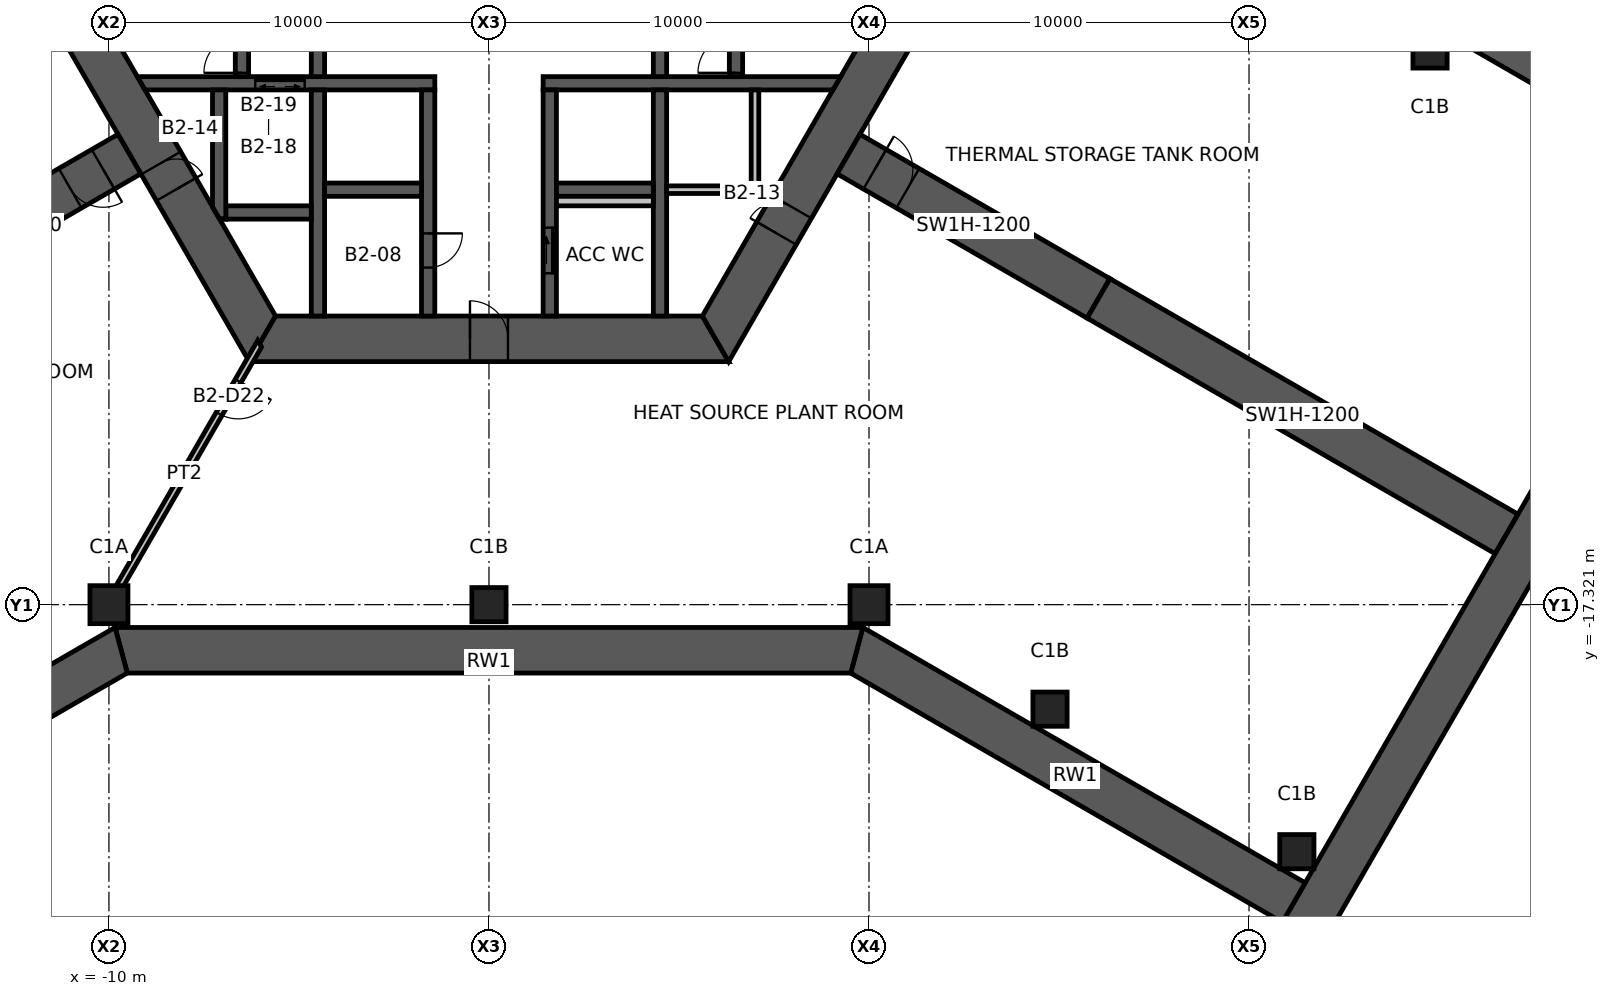
"""IFC4 building model, lengths in metres.
Left out: names, types, materials, properties, quantities, classifications, styles, units other than length and angle.
Written with IfcOpenShell. Run it as: python <this file> out.ifc"""

import sys

from ifc_helpers import new_model, si_unit, direction, frame, frame_2d, origin, origin_2d, place, context, subcontext, project, spatial, polyline, rectangle, hollow_rectangle, outline, extrude, element, fill, save


model = new_model("IFC4")
c1 = context("Model", 3, precision=1e-05, world=origin(), true_north=direction((0.0, 1.0)))
c2 = subcontext(c1, "Body", "Model", "MODEL_VIEW")
j1 = project(units=[si_unit("LENGTHUNIT", "METRE"), si_unit("PLANEANGLEUNIT", "RADIAN")], contexts=[c1])
p1 = place(None, origin())
s1 = spatial("IfcSite", under=j1, at=p1, CompositionType="ELEMENT")
p2 = place(p1, origin())
s2 = spatial("IfcBuilding", under=s1, at=p2, CompositionType="ELEMENT")
p3 = place(p2, frame((0.0, 0.0, -10.0)))
s3 = spatial("IfcBuildingStorey", under=s2, at=p3, CompositionType="ELEMENT", Elevation=-10.0)
for number, where, z_axis, x_axis in (
    (1, (-10.0, -17.321, -1.2), (0.0, 0.0, 1.0), (1.0, 0.0, 0.0)),
    (2, (10.0, -17.321, -1.2), (0.0, 0.0, 1.0), (1.0, 0.0, 0.0)),
):
    element("IfcColumn", number, at=place(p3, frame(where, z_axis=z_axis, x_axis=x_axis)), inside=s3, PredefinedType="COLUMN", context=c2, shape_type="SweptSolid", body=[
        extrude(hollow_rectangle(XDim=1.0, YDim=1.0, WallThickness=0.06, at=origin_2d()), origin(), (0.0, 0.0, 1.0), 6.2),
    ])
for number, where, z_axis, x_axis in (
    (3, (0.0, -17.321, -1.2), (0.0, 0.0, 1.0), (1.0, 0.0, 0.0)),
    (4, (14.763, -20.071, -1.2), (0.0, 0.0, 1.0), (1.0, 0.0, 0.0)),
    (5, (21.258, -23.821, -1.2), (0.0, 0.0, 1.0), (1.0, 0.0, 0.0)),
    (6, (24.763, -2.75, -1.2), (0.0, 0.0, 1.0), (1.0, 0.0, 0.0)),
):
    element("IfcColumn", number, at=place(p3, frame(where, z_axis=z_axis, x_axis=x_axis)), inside=s3, PredefinedType="COLUMN", context=c2, shape_type="SweptSolid", body=[
        extrude(hollow_rectangle(XDim=0.9, YDim=0.9, WallThickness=0.05, at=origin_2d()), origin(), (0.0, 0.0, 1.0), 6.2),
    ])
p4 = place(p3, frame((-11.922, 0.0, 0.0), z_axis=(0.0, 0.0, 1.0), x_axis=(0.500004296715, -0.866022923061, 0.0)))
e7 = element("IfcWall", 7, at=p4, inside=s3, PredefinedType="SHEAR", context=c2, shape_type="SweptSolid", body=[
    extrude(outline(polyline([(-0.346, -0.6), (6.581, -0.6), (7.381, -0.6), (12.269, -0.6), (11.576, 0.6), (7.381, 0.6), (6.581, 0.6), (0.346, 0.6), (-0.346, -0.6)])), origin(), (0.0, 0.0, 1.0), 5.0),
])
p5 = place(p4, frame((6.581, 0.0, 0.0)))
e8 = element("IfcOpeningElement", 8, at=p5, cuts=e7, PredefinedType="OPENING", context=c2, shape_type="SweptSolid", body=[
    extrude(rectangle(XDim=0.8, YDim=2.1, at=frame_2d((0.4, 1.05))), frame((0.0, 0.61, 0.0), z_axis=(0.0, -1.0, 0.0), x_axis=(1.0, 0.0, 0.0)), (0.0, 0.0, 1.0), 1.22),
])
p6 = place(p3, frame((-5.961, -10.325, 0.0), z_axis=(0.0, 0.0, 1.0), x_axis=(1.0, 0.0, 0.0)))
e9 = element("IfcWall", 9, at=p6, inside=s3, PredefinedType="SHEAR", context=c2, shape_type="SweptSolid", body=[
    extrude(outline(polyline([(-0.346, -0.6), (5.461, -0.6), (6.461, -0.6), (12.269, -0.6), (11.576, 0.6), (6.461, 0.6), (5.461, 0.6), (0.346, 0.6), (-0.346, -0.6)])), origin(), (0.0, 0.0, 1.0), 5.0),
])
p7 = place(p6, frame((5.461, 0.0, 0.0)))
e10 = element("IfcOpeningElement", 10, at=p7, cuts=e9, PredefinedType="OPENING", context=c2, shape_type="SweptSolid", body=[
    extrude(rectangle(XDim=1.0, YDim=2.1, at=frame_2d((0.5, 1.05))), frame((0.0, 0.61, 0.0), z_axis=(0.0, -1.0, 0.0), x_axis=(1.0, 0.0, 0.0)), (0.0, 0.0, 1.0), 1.22),
])
p8 = place(p3, frame((5.961, -10.325, 0.0), z_axis=(0.0, 0.0, 1.0), x_axis=(0.500004296715, 0.866022923061, 0.0)))
e11 = element("IfcWall", 11, at=p8, inside=s3, PredefinedType="SHEAR", context=c2, shape_type="SweptSolid", body=[
    extrude(outline(polyline([(-0.346, -0.6), (3.208, -0.6), (4.009, -0.6), (12.269, -0.6), (11.576, 0.6), (4.009, 0.6), (3.208, 0.6), (0.346, 0.6), (-0.346, -0.6)])), origin(), (0.0, 0.0, 1.0), 5.0),
])
p9 = place(p8, frame((3.208, 0.0, 0.0)))
e12 = element("IfcOpeningElement", 12, at=p9, cuts=e11, PredefinedType="OPENING", context=c2, shape_type="SweptSolid", body=[
    extrude(rectangle(XDim=0.8, YDim=2.1, at=frame_2d((0.4, 1.05))), frame((0.0, 0.61, 0.0), z_axis=(0.0, -1.0, 0.0), x_axis=(1.0, 0.0, 0.0)), (0.0, 0.0, 1.0), 1.22),
])
p10 = place(p3, frame((-9.461, -5.462, 0.0), z_axis=(0.0, 0.0, 1.0), x_axis=(-0.866019116917, -0.500010889016, 0.0)))
e13 = element("IfcWall", 13, at=p10, inside=s3, PredefinedType="SHEAR", context=c2, shape_type="SweptSolid", body=[
    extrude(rectangle(XDim=7.595, YDim=1.2, at=frame_2d((3.798, 0.0))), origin(), (0.0, 0.0, 1.0), 5.0),
])
p11 = place(p10, frame((0.8, 0.0, 0.0)))
e14 = element("IfcOpeningElement", 14, at=p11, cuts=e13, PredefinedType="OPENING", context=c2, shape_type="SweptSolid", body=[
    extrude(rectangle(XDim=1.0, YDim=2.1, at=frame_2d((0.5, 1.05))), frame((0.0, 0.61, 0.0), z_axis=(0.0, -1.0, 0.0), x_axis=(1.0, 0.0, 0.0)), (0.0, 0.0, 1.0), 1.22),
])
p12 = place(p3, frame((9.461, -5.462, 0.0), z_axis=(0.0, 0.0, 1.0), x_axis=(0.866019116917, -0.500010889016, 0.0)))
e15 = element("IfcWall", 15, at=p12, inside=s3, PredefinedType="SHEAR", context=c2, shape_type="SweptSolid", body=[
    extrude(rectangle(XDim=7.595, YDim=1.2, at=frame_2d((3.798, 0.0))), origin(), (0.0, 0.0, 1.0), 5.0),
])
p13 = place(p12, frame((0.8, 0.0, 0.0)))
e16 = element("IfcOpeningElement", 16, at=p13, cuts=e15, PredefinedType="OPENING", context=c2, shape_type="SweptSolid", body=[
    extrude(rectangle(XDim=1.0, YDim=2.1, at=frame_2d((0.5, 1.05))), frame((0.0, 0.61, 0.0), z_axis=(0.0, -1.0, 0.0), x_axis=(1.0, 0.0, 0.0)), (0.0, 0.0, 1.0), 1.22),
])
p14 = place(p3, frame((16.039, -9.26, 0.0), z_axis=(0.0, 0.0, 1.0), x_axis=(0.866023285932, -0.50000366821, 0.0)))
e17 = element("IfcWall", 17, at=p14, inside=s3, PredefinedType="SHEAR", context=c2, shape_type="SweptSolid", body=[
    extrude(rectangle(XDim=12.4, YDim=1.2, at=frame_2d((6.2, 0.0))), origin(), (0.0, 0.0, 1.0), 5.0),
])
p15 = place(p3, frame((20.878, 0.878, 0.0), z_axis=(0.0, 0.0, 1.0), x_axis=(0.866028209229, -0.499995140796, 0.0)))
e18 = element("IfcWall", 18, at=p15, inside=s3, PredefinedType="SOLIDWALL", context=c2, shape_type="SweptSolid", body=[
    extrude(outline(polyline([(-0.161, -0.6), (13.279, -0.6), (13.279, 0.6), (0.161, 0.6), (-0.161, -0.6)])), origin(), (0.0, 0.0, 1.0), 5.0),
])
p16 = place(p3, frame((33.198, -5.541, 0.0), z_axis=(0.0, 0.0, 1.0), x_axis=(-0.500005427746, -0.866022270051, 0.0)))
e19 = element("IfcWall", 19, at=p16, inside=s3, PredefinedType="SOLIDWALL", context=c2, shape_type="SweptSolid", body=[
    extrude(rectangle(XDim=23.6, YDim=1.2, at=frame_2d((11.8, 0.0))), origin(), (0.0, 0.0, 1.0), 5.0),
])
p17 = place(p3, frame((21.178, -25.16, 0.0), z_axis=(0.0, 0.0, 1.0), x_axis=(-0.866028209229, 0.499995140796, 0.0)))
e20 = element("IfcWall", 20, at=p17, inside=s3, PredefinedType="SOLIDWALL", context=c2, shape_type="SweptSolid", body=[
    extrude(outline(polyline([(0.0, -0.6), (13.439, -0.6), (13.118, 0.6), (0.0, 0.6), (0.0, -0.6)])), origin(), (0.0, 0.0, 1.0), 5.0),
])
p18 = place(p3, frame((9.678, -18.521, 0.0), z_axis=(0.0, 0.0, 1.0), x_axis=(-1.0, 0.0, 0.0)))
e21 = element("IfcWall", 21, at=p18, inside=s3, PredefinedType="SOLIDWALL", context=c2, shape_type="SweptSolid", body=[
    extrude(outline(polyline([(-0.161, -0.6), (19.518, -0.6), (19.196, 0.6), (0.161, 0.6), (-0.161, -0.6)])), origin(), (0.0, 0.0, 1.0), 5.0),
])
p19 = place(p3, frame((-9.678, -18.521, 0.0), z_axis=(0.0, 0.0, 1.0), x_axis=(-0.866028209229, -0.499995140796, 0.0)))
e22 = element("IfcWall", 22, at=p19, inside=s3, PredefinedType="SOLIDWALL", context=c2, shape_type="SweptSolid", body=[
    extrude(outline(polyline([(-0.161, -0.6), (13.279, -0.6), (13.279, 0.6), (0.161, 0.6), (-0.161, -0.6)])), origin(), (0.0, 0.0, 1.0), 5.0),
])
p20 = place(p3, frame((-9.151, -3.6, 0.0), z_axis=(0.0, 0.0, 1.0), x_axis=(1.0, 0.0, 0.0)))
e23 = element("IfcWall", 23, at=p20, inside=s3, PredefinedType="SHEAR", context=c2, shape_type="SweptSolid", body=[
    extrude(outline(polyline([(0.101, -0.175), (3.001, -0.175), (4.301, -0.175), (7.726, -0.175), (7.726, 0.175), (4.301, 0.175), (3.001, 0.175), (-0.101, 0.175), (0.101, -0.175)])), origin(), (0.0, 0.0, 1.0), 5.0),
])
p21 = place(p20, frame((3.001, 0.0, 0.0)))
e24 = element("IfcOpeningElement", 24, at=p21, cuts=e23, PredefinedType="OPENING", context=c2, shape_type="SweptSolid", body=[
    extrude(rectangle(XDim=1.3, YDim=2.1, at=frame_2d((0.65, 1.05))), frame((0.0, 0.185, 0.0), z_axis=(0.0, -1.0, 0.0), x_axis=(1.0, 0.0, 0.0)), (0.0, 0.0, 1.0), 0.37),
])
p22 = place(p3, frame((1.425, -3.6, 0.0), z_axis=(0.0, 0.0, 1.0), x_axis=(1.0, 0.0, 0.0)))
e25 = element("IfcWall", 25, at=p22, inside=s3, PredefinedType="SHEAR", context=c2, shape_type="SweptSolid", body=[
    extrude(outline(polyline([(0.0, -0.175), (7.625, -0.175), (7.827, 0.175), (0.0, 0.175), (0.0, -0.175)])), origin(), (0.0, 0.0, 1.0), 5.0),
])
p23 = place(p3, frame((-1.6, -3.775, 0.0), z_axis=(0.0, 0.0, 1.0), x_axis=(0.0, -1.0, 0.0)))
e26 = element("IfcWall", 26, at=p23, inside=s3, PredefinedType="SHEAR", context=c2, shape_type="SweptSolid", body=[
    extrude(rectangle(XDim=5.95, YDim=0.35, at=frame_2d((2.975, 0.0))), origin(), (0.0, 0.0, 1.0), 5.0),
])
p24 = place(p23, frame((3.775, 0.0, 0.0)))
e27 = element("IfcOpeningElement", 27, at=p24, cuts=e26, PredefinedType="OPENING", context=c2, shape_type="SweptSolid", body=[
    extrude(rectangle(XDim=0.9, YDim=2.1, at=frame_2d((0.45, 1.05))), frame((0.0, 0.185, 0.0), z_axis=(0.0, -1.0, 0.0), x_axis=(1.0, 0.0, 0.0)), (0.0, 0.0, 1.0), 0.37),
])
p25 = place(p3, frame((1.6, -3.775, 0.0), z_axis=(0.0, 0.0, 1.0), x_axis=(0.0, -1.0, 0.0)))
e28 = element("IfcWall", 28, at=p25, inside=s3, PredefinedType="SHEAR", context=c2, shape_type="SweptSolid", body=[
    extrude(rectangle(XDim=5.95, YDim=0.35, at=frame_2d((2.975, 0.0))), origin(), (0.0, 0.0, 1.0), 5.0),
])
p26 = place(p25, frame((3.625, 0.0, 0.0)))
e29 = element("IfcOpeningElement", 29, at=p26, cuts=e28, PredefinedType="OPENING", context=c2, shape_type="SweptSolid", body=[
    extrude(rectangle(XDim=1.2, YDim=2.1, at=frame_2d((0.6, 1.05))), frame((0.0, 0.185, 0.0), z_axis=(0.0, -1.0, 0.0), x_axis=(1.0, 0.0, 0.0)), (0.0, 0.0, 1.0), 0.37),
])
p27 = place(p3, frame((-4.5, -3.425, 0.0), z_axis=(0.0, 0.0, 1.0), x_axis=(0.0, 1.0, 0.0)))
e30 = element("IfcWall", 30, at=p27, inside=s3, PredefinedType="SHEAR", context=c2, shape_type="SweptSolid", body=[
    extrude(rectangle(XDim=6.85, YDim=0.35, at=frame_2d((3.425, 0.0))), origin(), (0.0, 0.0, 1.0), 5.0),
])
p28 = place(p27, frame((2.925, 0.0, 0.0)))
e31 = element("IfcOpeningElement", 31, at=p28, cuts=e30, PredefinedType="OPENING", context=c2, shape_type="SweptSolid", body=[
    extrude(rectangle(XDim=1.0, YDim=2.1, at=frame_2d((0.5, 1.05))), frame((0.0, 0.185, 0.0), z_axis=(0.0, -1.0, 0.0), x_axis=(1.0, 0.0, 0.0)), (0.0, 0.0, 1.0), 0.37),
])
p29 = place(p3, frame((4.5, -3.425, 0.0), z_axis=(0.0, 0.0, 1.0), x_axis=(0.0, 1.0, 0.0)))
e32 = element("IfcWall", 32, at=p29, inside=s3, PredefinedType="SHEAR", context=c2, shape_type="SweptSolid", body=[
    extrude(rectangle(XDim=6.85, YDim=0.35, at=frame_2d((3.425, 0.0))), origin(), (0.0, 0.0, 1.0), 5.0),
])
p30 = place(p29, frame((2.925, 0.0, 0.0)))
e33 = element("IfcOpeningElement", 33, at=p30, cuts=e32, PredefinedType="OPENING", context=c2, shape_type="SweptSolid", body=[
    extrude(rectangle(XDim=1.0, YDim=2.1, at=frame_2d((0.5, 1.05))), frame((0.0, 0.185, 0.0), z_axis=(0.0, -1.0, 0.0), x_axis=(1.0, 0.0, 0.0)), (0.0, 0.0, 1.0), 0.37),
])
p31 = place(p3, frame((-6.5, -3.425, 0.0), z_axis=(0.0, 0.0, 1.0), x_axis=(0.0, 1.0, 0.0)))
e34 = element("IfcWall", 34, at=p31, inside=s3, PredefinedType="SHEAR", context=c2, shape_type="SweptSolid", body=[
    extrude(rectangle(XDim=6.85, YDim=0.35, at=frame_2d((3.425, 0.0))), origin(), (0.0, 0.0, 1.0), 5.0),
])
p32 = place(p31, frame((0.1, 0.0, 0.0)))
e35 = element("IfcOpeningElement", 35, at=p32, cuts=e34, PredefinedType="OPENING", context=c2, shape_type="SweptSolid", body=[
    extrude(rectangle(XDim=1.0, YDim=2.1, at=frame_2d((0.5, 1.05))), frame((0.0, 0.185, 0.0), z_axis=(0.0, -1.0, 0.0), x_axis=(1.0, 0.0, 0.0)), (0.0, 0.0, 1.0), 0.37),
])
p33 = place(p3, frame((6.5, -3.425, 0.0), z_axis=(0.0, 0.0, 1.0), x_axis=(0.0, 1.0, 0.0)))
e36 = element("IfcWall", 36, at=p33, inside=s3, PredefinedType="SHEAR", context=c2, shape_type="SweptSolid", body=[
    extrude(rectangle(XDim=6.85, YDim=0.35, at=frame_2d((3.425, 0.0))), origin(), (0.0, 0.0, 1.0), 5.0),
])
p34 = place(p33, frame((0.1, 0.0, 0.0)))
e37 = element("IfcOpeningElement", 37, at=p34, cuts=e36, PredefinedType="OPENING", context=c2, shape_type="SweptSolid", body=[
    extrude(rectangle(XDim=1.0, YDim=2.1, at=frame_2d((0.5, 1.05))), frame((0.0, 0.185, 0.0), z_axis=(0.0, -1.0, 0.0), x_axis=(1.0, 0.0, 0.0)), (0.0, 0.0, 1.0), 0.37),
])
for number, where, z_axis, x_axis in (
    (38, (-4.5, -3.775, 0.0), (0.0, 0.0, 1.0), (0.0, -1.0, 0.0)),
    (39, (4.5, -3.775, 0.0), (0.0, 0.0, 1.0), (0.0, -1.0, 0.0)),
):
    element("IfcWall", number, at=place(p3, frame(where, z_axis=z_axis, x_axis=x_axis)), inside=s3, PredefinedType="SHEAR", context=c2, shape_type="SweptSolid", body=[
        extrude(rectangle(XDim=5.95, YDim=0.35, at=frame_2d((2.975, 0.0))), origin(), (0.0, 0.0, 1.0), 5.0),
    ])
for number, where, z_axis, x_axis in (
    (40, (-4.325, -6.4, 0.0), (0.0, 0.0, 1.0), (1.0, 0.0, 0.0)),
    (41, (1.775, -6.4, 0.0), (0.0, 0.0, 1.0), (1.0, 0.0, 0.0)),
):
    element("IfcWall", number, at=place(p3, frame(where, z_axis=z_axis, x_axis=x_axis)), inside=s3, PredefinedType="SHEAR", context=c2, shape_type="SweptSolid", body=[
        extrude(rectangle(XDim=2.55, YDim=0.35, at=frame_2d((1.275, 0.0))), origin(), (0.0, 0.0, 1.0), 5.0),
    ])
p35 = place(p3, frame((-6.925, -7.0, 0.0), z_axis=(0.0, 0.0, 1.0), x_axis=(1.0, 0.0, 0.0)))
e42 = element("IfcWall", 42, at=p35, inside=s3, PredefinedType="SHEAR", context=c2, shape_type="SweptSolid", body=[
    extrude(rectangle(XDim=2.25, YDim=0.35, at=frame_2d((1.125, 0.0))), origin(), (0.0, 0.0, 1.0), 5.0),
])
p36 = place(p3, frame((-7.1, -3.775, 0.0), z_axis=(0.0, 0.0, 1.0), x_axis=(0.0, -1.0, 0.0)))
e43 = element("IfcWall", 43, at=p36, inside=s3, PredefinedType="SHEAR", context=c2, shape_type="SweptSolid", body=[
    extrude(outline(polyline([(0.0, -0.175), (3.074, -0.175), (3.377, 0.0), (3.4, 0.175), (0.0, 0.175), (0.0, -0.175)])), origin(), (0.0, 0.0, 1.0), 5.0),
])
p37 = place(p3, frame((4.675, -6.4, 0.0), z_axis=(0.0, 0.0, 1.0), x_axis=(1.0, 0.0, 0.0)))
e44 = element("IfcWall", 44, at=p37, inside=s3, PredefinedType="STANDARD", context=c2, shape_type="SweptSolid", body=[
    extrude(rectangle(XDim=2.425, YDim=0.2, at=frame_2d((1.212, 0.0))), origin(), (0.0, 0.0, 1.0), 5.0),
])
p38 = place(p3, frame((7.0, -3.775, 0.0), z_axis=(0.0, 0.0, 1.0), x_axis=(0.0, -1.0, 0.0)))
e45 = element("IfcWall", 45, at=p38, inside=s3, PredefinedType="STANDARD", context=c2, shape_type="SweptSolid", body=[
    extrude(rectangle(XDim=2.525, YDim=0.2, at=frame_2d((1.263, 0.0))), origin(), (0.0, 0.0, 1.0), 5.0),
])
p39 = place(p3, frame((1.775, -6.7, 0.0), z_axis=(0.0, 0.0, 1.0), x_axis=(1.0, 0.0, 0.0)))
e46 = element("IfcWall", 46, at=p39, inside=s3, PredefinedType="PLUMBINGWALL", context=c2, shape_type="SweptSolid", body=[
    extrude(rectangle(XDim=2.55, YDim=0.25, at=frame_2d((1.275, 0.0))), origin(), (0.0, 0.0, 1.0), 5.0),
])
p40 = place(p3, frame((-6.035, -10.453, 0.0), z_axis=(0.0, 0.0, 1.0), x_axis=(-0.499993402427, -0.866029212861, 0.0)))
e47 = element("IfcWall", 47, at=p40, inside=s3, PredefinedType="PARTITIONING", context=c2, shape_type="SweptSolid", body=[
    extrude(outline(polyline([(-0.051, -0.087), (1.129, -0.087), (2.129, -0.087), (7.93, -0.087), (7.93, 0.087), (2.129, 0.087), (1.129, 0.087), (0.051, 0.087), (-0.051, -0.087)])), origin(), (0.0, 0.0, 1.0), 3.85),
])
p41 = place(p40, frame((1.129, 0.0, 0.0)))
e48 = element("IfcOpeningElement", 48, at=p41, cuts=e47, PredefinedType="OPENING", context=c2, shape_type="SweptSolid", body=[
    extrude(rectangle(XDim=1.0, YDim=2.1, at=frame_2d((0.5, 1.05))), frame((0.0, 0.098, 0.0), z_axis=(0.0, -1.0, 0.0), x_axis=(1.0, 0.0, 0.0)), (0.0, 0.0, 1.0), 0.195),
])
p42 = place(p7, origin())
e49 = element("IfcDoor", 49, at=p42, inside=s3, OperationType="SINGLE_SWING_LEFT", PredefinedType="DOOR", context=c2, shape_type="SweptSolid", body=[
    extrude(rectangle(XDim=1.0, YDim=2.1, at=frame_2d((0.5, 1.05))), frame((0.0, 0.025, 0.0), z_axis=(0.0, -1.0, 0.0), x_axis=(1.0, 0.0, 0.0)), (0.0, 0.0, 1.0), 0.05),
])
fill(e10, e49)
p43 = place(p9, origin())
e50 = element("IfcDoor", 50, at=p43, inside=s3, OperationType="SINGLE_SWING_LEFT", PredefinedType="DOOR", context=c2, shape_type="SweptSolid", body=[
    extrude(rectangle(XDim=0.8, YDim=2.1, at=frame_2d((0.4, 1.05))), frame((0.0, 0.025, 0.0), z_axis=(0.0, -1.0, 0.0), x_axis=(1.0, 0.0, 0.0)), (0.0, 0.0, 1.0), 0.05),
])
fill(e12, e50)
p44 = place(p5, origin())
e51 = element("IfcDoor", 51, at=p44, inside=s3, OperationType="SINGLE_SWING_RIGHT", PredefinedType="DOOR", context=c2, shape_type="SweptSolid", body=[
    extrude(rectangle(XDim=0.8, YDim=2.1, at=frame_2d((0.4, 1.05))), frame((0.0, 0.025, 0.0), z_axis=(0.0, -1.0, 0.0), x_axis=(1.0, 0.0, 0.0)), (0.0, 0.0, 1.0), 0.05),
])
fill(e8, e51)
p45 = place(p34, origin())
e52 = element("IfcDoor", 52, at=p45, inside=s3, OperationType="SINGLE_SWING_LEFT", PredefinedType="DOOR", context=c2, shape_type="SweptSolid", body=[
    extrude(rectangle(XDim=1.0, YDim=2.1, at=frame_2d((0.5, 1.05))), frame((0.0, 0.025, 0.0), z_axis=(0.0, -1.0, 0.0), x_axis=(1.0, 0.0, 0.0)), (0.0, 0.0, 1.0), 0.05),
])
fill(e37, e52)
p46 = place(p32, origin())
e53 = element("IfcDoor", 53, at=p46, inside=s3, OperationType="SINGLE_SWING_LEFT", PredefinedType="DOOR", context=c2, shape_type="SweptSolid", body=[
    extrude(rectangle(XDim=1.0, YDim=2.1, at=frame_2d((0.5, 1.05))), frame((0.0, 0.025, 0.0), z_axis=(0.0, -1.0, 0.0), x_axis=(1.0, 0.0, 0.0)), (0.0, 0.0, 1.0), 0.05),
])
fill(e35, e53)
p47 = place(p26, origin())
e54 = element("IfcDoor", 54, at=p47, inside=s3, OperationType="SLIDING_TO_LEFT", PredefinedType="DOOR", context=c2, shape_type="SweptSolid", body=[
    extrude(rectangle(XDim=1.2, YDim=2.1, at=frame_2d((0.6, 1.05))), frame((0.0, 0.025, 0.0), z_axis=(0.0, -1.0, 0.0), x_axis=(1.0, 0.0, 0.0)), (0.0, 0.0, 1.0), 0.05),
])
fill(e29, e54)
p48 = place(p24, origin())
e55 = element("IfcDoor", 55, at=p48, inside=s3, OperationType="SINGLE_SWING_LEFT", PredefinedType="DOOR", context=c2, shape_type="SweptSolid", body=[
    extrude(rectangle(XDim=0.9, YDim=2.1, at=frame_2d((0.45, 1.05))), frame((0.0, 0.025, 0.0), z_axis=(0.0, -1.0, 0.0), x_axis=(1.0, 0.0, 0.0)), (0.0, 0.0, 1.0), 0.05),
])
fill(e27, e55)
p49 = place(p11, origin())
e56 = element("IfcDoor", 56, at=p49, inside=s3, OperationType="SINGLE_SWING_LEFT", PredefinedType="DOOR", context=c2, shape_type="SweptSolid", body=[
    extrude(rectangle(XDim=1.0, YDim=2.1, at=frame_2d((0.5, 1.05))), frame((0.0, 0.025, 0.0), z_axis=(0.0, -1.0, 0.0), x_axis=(1.0, 0.0, 0.0)), (0.0, 0.0, 1.0), 0.05),
])
fill(e14, e56)
p50 = place(p13, origin())
e57 = element("IfcDoor", 57, at=p50, inside=s3, OperationType="SINGLE_SWING_LEFT", PredefinedType="DOOR", context=c2, shape_type="SweptSolid", body=[
    extrude(rectangle(XDim=1.0, YDim=2.1, at=frame_2d((0.5, 1.05))), frame((0.0, 0.025, 0.0), z_axis=(0.0, -1.0, 0.0), x_axis=(1.0, 0.0, 0.0)), (0.0, 0.0, 1.0), 0.05),
])
fill(e16, e57)
p51 = place(p41, origin())
e58 = element("IfcDoor", 58, at=p51, inside=s3, OperationType="SINGLE_SWING_LEFT", PredefinedType="DOOR", context=c2, shape_type="SweptSolid", body=[
    extrude(rectangle(XDim=1.0, YDim=2.1, at=frame_2d((0.5, 1.05))), frame((0.0, 0.025, 0.0), z_axis=(0.0, -1.0, 0.0), x_axis=(1.0, 0.0, 0.0)), (0.0, 0.0, 1.0), 0.05),
])
fill(e48, e58)
p52 = place(p21, origin())
e59 = element("IfcDoor", 59, at=p52, inside=s3, OperationType="DOUBLE_DOOR_SLIDING", PredefinedType="DOOR", context=c2, shape_type="SweptSolid", body=[
    extrude(rectangle(XDim=1.3, YDim=2.1, at=frame_2d((0.65, 1.05))), frame((0.0, 0.025, 0.0), z_axis=(0.0, -1.0, 0.0), x_axis=(1.0, 0.0, 0.0)), (0.0, 0.0, 1.0), 0.05),
])
fill(e24, e59)
save(model, sys.argv[1])
